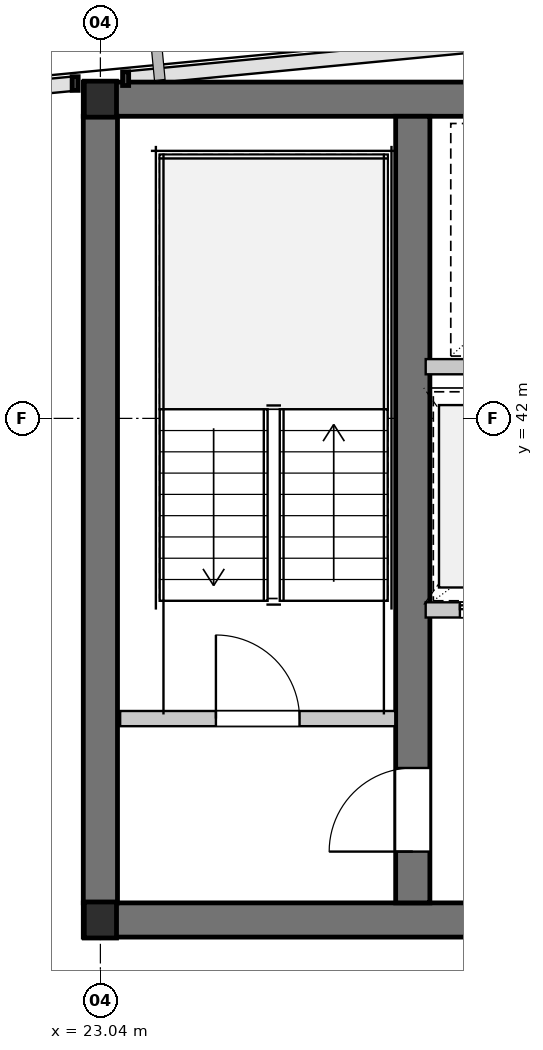
"""IFC4 building model, lengths in metres.
Left out: names, types, materials, properties, quantities, classifications, styles, units other than length and angle.
Written with IfcOpenShell. Run it as: python <this file> out.ifc"""

import sys

from ifc_helpers import new_model, si_unit, direction, frame, frame_2d, origin, origin_2d, place, context, subcontext, project, spatial, rectangle, i_section, extrude, element, fill, save


model = new_model("IFC4")
c1 = context("Model", 3, precision=1e-05, world=origin(), true_north=direction((0.0, 1.0)))
c2 = subcontext(c1, "Body", "Model", "MODEL_VIEW")
j1 = project(units=[si_unit("LENGTHUNIT", "METRE"), si_unit("PLANEANGLEUNIT", "RADIAN")], contexts=[c1])
p1 = place(None, origin())
s1 = spatial("IfcSite", under=j1, at=p1, CompositionType="ELEMENT")
p2 = place(p1, origin())
s2 = spatial("IfcBuilding", under=s1, at=p2, CompositionType="ELEMENT")
p3 = place(p2, frame((0.0, 0.0, 96.5)))
s3 = spatial("IfcBuildingStorey", under=s2, at=p3, CompositionType="ELEMENT", Elevation=96.5)
p4 = place(p3, frame((22.815, 46.2, 0.0), z_axis=(0.0, 0.0, 1.0), x_axis=(1.0, 0.0, 0.0)))
e1 = element("IfcWall", 1, at=p4, inside=s3, PredefinedType="SHEAR", context=c2, shape_type="SweptSolid", body=[
    extrude(rectangle(XDim=31.17, YDim=0.45, at=frame_2d((15.585, 0.0))), origin(), (0.0, 0.0, 1.0), 3.18),
])
p5 = place(p3, frame((22.815, 35.4, 0.0), z_axis=(0.0, 0.0, 1.0), x_axis=(1.0, 0.0, 0.0)))
e2 = element("IfcWall", 2, at=p5, inside=s3, PredefinedType="SHEAR", context=c2, shape_type="SweptSolid", body=[
    extrude(rectangle(XDim=5.385, YDim=0.45, at=frame_2d((2.692, 0.0))), origin(), (0.0, 0.0, 1.0), 3.18),
])
p6 = place(p3, frame((23.04, 35.625, 0.0), z_axis=(0.0, 0.0, 1.0), x_axis=(0.0, 1.0, 0.0)))
e3 = element("IfcWall", 3, at=p6, inside=s3, PredefinedType="SHEAR", context=c2, shape_type="SweptSolid", body=[
    extrude(rectangle(XDim=10.35, YDim=0.45, at=frame_2d((5.175, 0.0))), origin(), (0.0, 0.0, 1.0), 3.18),
])
p7 = place(p3, frame((27.15, 35.625, 0.0), z_axis=(0.0, 0.0, 1.0), x_axis=(0.0, 1.0, 0.0)))
e4 = element("IfcWall", 4, at=p7, inside=s3, PredefinedType="SHEAR", context=c2, shape_type="SweptSolid", body=[
    extrude(rectangle(XDim=10.35, YDim=0.45, at=frame_2d((5.175, 0.0))), origin(), (0.0, 0.0, 1.0), 3.18),
])
p8 = place(p7, frame((0.675, 0.0, 0.0)))
e5 = element("IfcOpeningElement", 5, at=p8, cuts=e4, PredefinedType="OPENING", context=c2, shape_type="SweptSolid", body=[
    extrude(rectangle(XDim=1.1, YDim=2.15, at=frame_2d((0.55, 1.075))), frame((0.0, 0.235, 0.0), z_axis=(0.0, -1.0, 0.0), x_axis=(1.0, 0.0, 0.0)), (0.0, 0.0, 1.0), 0.47),
])
for number, where, z_axis, x_axis in (
    (6, (23.04, 35.4, 0.0), (0.0, 0.0, 1.0), (1.0, 0.0, 0.0)),
    (7, (23.04, 46.2, 0.0), (0.0, 0.0, 1.0), (1.0, 0.0, 0.0)),
):
    element("IfcColumn", number, at=place(p3, frame(where, z_axis=z_axis, x_axis=x_axis)), inside=s3, PredefinedType="COLUMN", context=c2, shape_type="SweptSolid", body=[
        extrude(i_section(OverallWidth=0.424, OverallDepth=0.474, WebThickness=0.047, FlangeThickness=0.077, FilletRadius=0.015, at=origin_2d()), origin(), (0.0, 0.0, 1.0), 3.4),
    ])
p9 = place(p3, frame((23.3, 38.05, 0.0), z_axis=(0.0, 0.0, 1.0), x_axis=(1.0, 0.0, 0.0)))
e8 = element("IfcWall", 8, at=p9, inside=s3, PredefinedType="PARTITIONING", context=c2, shape_type="SweptSolid", body=[
    extrude(rectangle(XDim=3.62, YDim=0.2, at=frame_2d((1.81, 0.0))), origin(), (0.0, 0.0, 1.0), 3.18),
])
p10 = place(p9, frame((1.26, 0.0, 0.0)))
e9 = element("IfcOpeningElement", 9, at=p10, cuts=e8, PredefinedType="OPENING", context=c2, shape_type="SweptSolid", body=[
    extrude(rectangle(XDim=1.1, YDim=2.15, at=frame_2d((0.55, 1.075))), frame((0.0, 0.11, 0.0), z_axis=(0.0, -1.0, 0.0), x_axis=(1.0, 0.0, 0.0)), (0.0, 0.0, 1.0), 0.22),
])
p11 = place(p3, frame((27.32, 39.48, 0.0), z_axis=(0.0, 0.0, 1.0), x_axis=(1.0, 0.0, 0.0)))
e10 = element("IfcWall", 10, at=p11, inside=s3, PredefinedType="PARTITIONING", context=c2, shape_type="SweptSolid", body=[
    extrude(rectangle(XDim=3.94, YDim=0.2, at=frame_2d((1.97, 0.0))), origin(), (0.0, 0.0, 1.0), 3.18),
])
p12 = place(p11, frame((0.45, 0.0, 0.0)))
e11 = element("IfcOpeningElement", 11, at=p12, cuts=e10, PredefinedType="OPENING", context=c2, shape_type="SweptSolid", body=[
    extrude(rectangle(XDim=1.1, YDim=2.2, at=frame_2d((0.55, 1.1))), frame((0.0, 0.11, 0.0), z_axis=(0.0, -1.0, 0.0), x_axis=(1.0, 0.0, 0.0)), (0.0, 0.0, 1.0), 0.22),
])
p13 = place(p11, frame((2.41, 0.0, 0.0)))
e12 = element("IfcOpeningElement", 12, at=p13, cuts=e10, PredefinedType="OPENING", context=c2, shape_type="SweptSolid", body=[
    extrude(rectangle(XDim=1.1, YDim=2.2, at=frame_2d((0.55, 1.1))), frame((0.0, 0.11, 0.0), z_axis=(0.0, -1.0, 0.0), x_axis=(1.0, 0.0, 0.0)), (0.0, 0.0, 1.0), 0.22),
])
p14 = place(p3, frame((27.32, 42.68, 0.0), z_axis=(0.0, 0.0, 1.0), x_axis=(1.0, 0.0, 0.0)))
e13 = element("IfcWall", 13, at=p14, inside=s3, PredefinedType="PARTITIONING", context=c2, shape_type="SweptSolid", body=[
    extrude(rectangle(XDim=5.33, YDim=0.2, at=frame_2d((2.665, 0.0))), origin(), (0.0, 0.0, 1.0), 3.18),
])
p15 = place(p14, frame((4.18, 0.0, 0.0)))
e14 = element("IfcOpeningElement", 14, at=p15, cuts=e13, PredefinedType="OPENING", context=c2, shape_type="SweptSolid", body=[
    extrude(rectangle(XDim=0.9, YDim=2.15, at=frame_2d((0.45, 1.075))), frame((0.0, 0.11, 0.0), z_axis=(0.0, -1.0, 0.0), x_axis=(1.0, 0.0, 0.0)), (0.0, 0.0, 1.0), 0.22),
])
p16 = place(p10, origin())
e15 = element("IfcDoor", 15, at=p16, inside=s3, OperationType="SINGLE_SWING_LEFT", PredefinedType="DOOR", context=c2, shape_type="SweptSolid", body=[
    extrude(rectangle(XDim=1.1, YDim=2.15, at=frame_2d((0.55, 1.075))), frame((0.0, 0.025, 0.0), z_axis=(0.0, -1.0, 0.0), x_axis=(1.0, 0.0, 0.0)), (0.0, 0.0, 1.0), 0.05),
])
fill(e9, e15)
p17 = place(p12, origin())
e16 = element("IfcDoor", 16, at=p17, inside=s3, OperationType="DOUBLE_DOOR_SLIDING", PredefinedType="DOOR", context=c2, shape_type="SweptSolid", body=[
    extrude(rectangle(XDim=1.1, YDim=2.2, at=frame_2d((0.55, 1.1))), frame((0.0, 0.025, 0.0), z_axis=(0.0, -1.0, 0.0), x_axis=(1.0, 0.0, 0.0)), (0.0, 0.0, 1.0), 0.05),
])
fill(e11, e16)
p18 = place(p8, origin())
e17 = element("IfcDoor", 17, at=p18, inside=s3, OperationType="SINGLE_SWING_LEFT", PredefinedType="DOOR", context=c2, shape_type="SweptSolid", body=[
    extrude(rectangle(XDim=1.1, YDim=2.15, at=frame_2d((0.55, 1.075))), frame((0.0, 0.025, 0.0), z_axis=(0.0, -1.0, 0.0), x_axis=(1.0, 0.0, 0.0)), (0.0, 0.0, 1.0), 0.05),
])
fill(e5, e17)
save(model, sys.argv[1])
